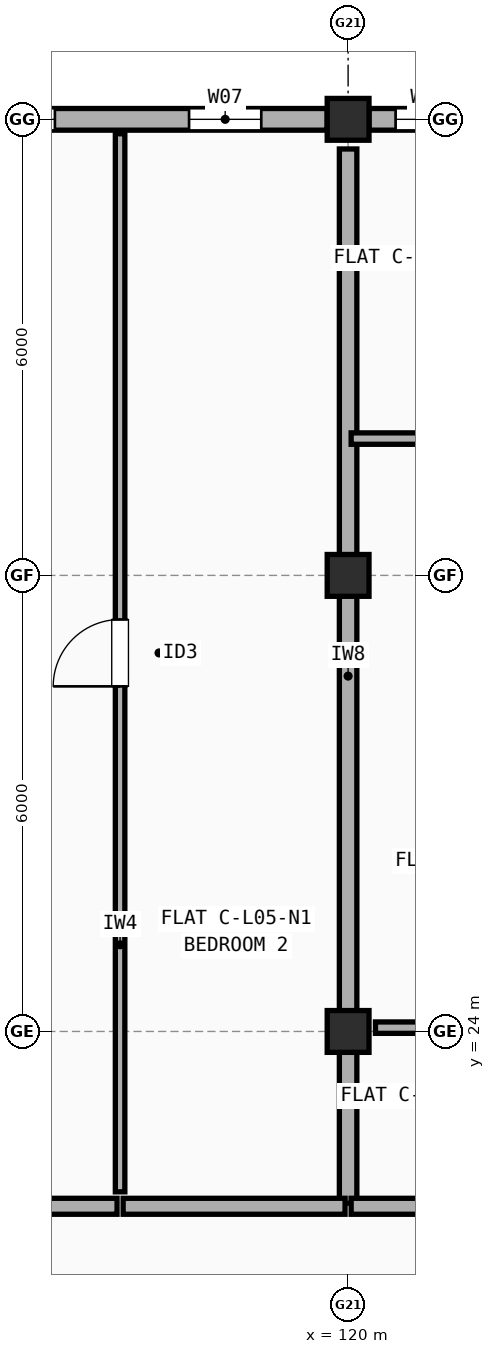
"""IFC4 building model, lengths in metres.
Left out: names, types, materials, properties, quantities, classifications, styles, units other than length and angle.
Written with IfcOpenShell. Run it as: python <this file> out.ifc"""

import sys

from ifc_helpers import new_model, si_unit, direction, frame, frame_2d, origin, origin_2d, place, context, subcontext, project, spatial, rectangle, extrude, element, fill, save


model = new_model("IFC4")
c1 = context("Model", 3, precision=1e-05, world=origin(), true_north=direction((0.0, 1.0)))
c2 = subcontext(c1, "Body", "Model", "MODEL_VIEW")
j1 = project(units=[si_unit("LENGTHUNIT", "METRE"), si_unit("PLANEANGLEUNIT", "RADIAN")], contexts=[c1])
p1 = place(None, origin())
s1 = spatial("IfcSite", under=j1, at=p1, CompositionType="ELEMENT")
p2 = place(p1, origin())
s2 = spatial("IfcBuilding", under=s1, at=p2, CompositionType="ELEMENT")
p3 = place(p2, frame((0.0, 0.0, 17.3)))
s3 = spatial("IfcBuildingStorey", under=s2, at=p3, CompositionType="ELEMENT", Elevation=17.3)
for number, where, z_axis, x_axis in (
    (1, (120.0, 24.0, 0.0), (0.0, 0.0, 1.0), (1.0, 0.0, 0.0)),
    (2, (120.0, 30.0, 0.0), (0.0, 0.0, 1.0), (1.0, 0.0, 0.0)),
    (3, (120.0, 36.0, 0.0), (0.0, 0.0, 1.0), (1.0, 0.0, 0.0)),
):
    element("IfcColumn", number, at=place(p3, frame(where, z_axis=z_axis, x_axis=x_axis)), inside=s3, PredefinedType="COLUMN", context=c2, shape_type="SweptSolid", body=[
        extrude(rectangle(XDim=0.55, YDim=0.55, at=origin_2d()), origin(), (0.0, 0.0, 1.0), 2.965),
    ])
p4 = place(p3, frame((125.725, 36.0, 0.0), z_axis=(0.0, 0.0, 1.0), x_axis=(-1.0, 0.0, 0.0)))
e4 = element("IfcWall", 4, at=p4, inside=s3, PredefinedType="STANDARD", context=c2, shape_type="SweptSolid", body=[
    extrude(rectangle(XDim=5.45, YDim=0.285, at=frame_2d((2.725, 0.0))), origin(), (0.0, 0.0, 1.0), 2.447),
])
p5 = place(p4, frame((1.615, 0.0, 0.9)))
e5 = element("IfcOpeningElement", 5, at=p5, cuts=e4, PredefinedType="OPENING", context=c2, shape_type="SweptSolid", body=[
    extrude(rectangle(XDim=0.85, YDim=1.25, at=frame_2d((0.425, 0.625))), frame((0.0, 0.152, 0.0), z_axis=(0.0, -1.0, 0.0), x_axis=(1.0, 0.0, 0.0)), (0.0, 0.0, 1.0), 0.305),
])
p6 = place(p4, frame((4.25, 0.0, 0.9)))
e6 = element("IfcOpeningElement", 6, at=p6, cuts=e4, PredefinedType="OPENING", context=c2, shape_type="SweptSolid", body=[
    extrude(rectangle(XDim=0.85, YDim=1.25, at=frame_2d((0.425, 0.625))), frame((0.0, 0.152, 0.0), z_axis=(0.0, -1.0, 0.0), x_axis=(1.0, 0.0, 0.0)), (0.0, 0.0, 1.0), 0.305),
])
p7 = place(p3, frame((119.725, 36.0, 0.0), z_axis=(0.0, 0.0, 1.0), x_axis=(-1.0, 0.0, 0.0)))
e7 = element("IfcWall", 7, at=p7, inside=s3, PredefinedType="STANDARD", context=c2, shape_type="SweptSolid", body=[
    extrude(rectangle(XDim=5.45, YDim=0.285, at=frame_2d((2.725, 0.0))), origin(), (0.0, 0.0, 1.0), 2.447),
])
p8 = place(p7, frame((0.867, 0.0, 0.9)))
e8 = element("IfcOpeningElement", 8, at=p8, cuts=e7, PredefinedType="OPENING", context=c2, shape_type="SweptSolid", body=[
    extrude(rectangle(XDim=0.95, YDim=1.35, at=frame_2d((0.475, 0.675))), frame((0.0, 0.152, 0.0), z_axis=(0.0, -1.0, 0.0), x_axis=(1.0, 0.0, 0.0)), (0.0, 0.0, 1.0), 0.305),
])
p9 = place(p7, frame((3.583, 0.0, 0.9)))
e9 = element("IfcOpeningElement", 9, at=p9, cuts=e7, PredefinedType="OPENING", context=c2, shape_type="SweptSolid", body=[
    extrude(rectangle(XDim=1.05, YDim=1.35, at=frame_2d((0.525, 0.675))), frame((0.0, 0.152, 0.0), z_axis=(0.0, -1.0, 0.0), x_axis=(1.0, 0.0, 0.0)), (0.0, 0.0, 1.0), 0.305),
])
p10 = place(p3, frame((120.0, 21.74, 0.0), z_axis=(0.0, 0.0, 1.0), x_axis=(0.0, 1.0, 0.0)))
e10 = element("IfcWall", 10, at=p10, inside=s3, PredefinedType="SOLIDWALL", context=c2, shape_type="SweptSolid", body=[
    extrude(rectangle(XDim=13.87, YDim=0.23, at=frame_2d((6.935, 0.0))), origin(), (0.0, 0.0, 1.0), 2.508),
])
p11 = place(p3, frame((106.54, 21.7, 0.0), z_axis=(0.0, 0.0, 1.0), x_axis=(1.0, 0.0, 0.0)))
e11 = element("IfcWall", 11, at=p11, inside=s3, PredefinedType="SOLIDWALL", context=c2, shape_type="SweptSolid", body=[
    extrude(rectangle(XDim=10.42, YDim=0.21, at=frame_2d((5.21, 0.0))), origin(), (0.0, 0.0, 1.0), 2.508),
])
p12 = place(p11, frame((4.685, 0.0, 0.0)))
e12 = element("IfcOpeningElement", 12, at=p12, cuts=e11, PredefinedType="OPENING", context=c2, shape_type="SweptSolid", body=[
    extrude(rectangle(XDim=1.05, YDim=2.15, at=frame_2d((0.525, 1.075))), frame((0.0, 0.115, 0.0), z_axis=(0.0, -1.0, 0.0), x_axis=(1.0, 0.0, 0.0)), (0.0, 0.0, 1.0), 0.23),
])
p13 = place(p3, frame((117.04, 21.7, 0.0), z_axis=(0.0, 0.0, 1.0), x_axis=(1.0, 0.0, 0.0)))
e13 = element("IfcWall", 13, at=p13, inside=s3, PredefinedType="SOLIDWALL", context=c2, shape_type="SweptSolid", body=[
    extrude(rectangle(XDim=2.92, YDim=0.21, at=frame_2d((1.46, 0.0))), origin(), (0.0, 0.0, 1.0), 2.965),
])
p14 = place(p3, frame((117.0, 21.89, 0.0), z_axis=(0.0, 0.0, 1.0), x_axis=(0.0, 1.0, 0.0)))
e14 = element("IfcWall", 14, at=p14, inside=s3, PredefinedType="PARTITIONING", context=c2, shape_type="SweptSolid", body=[
    extrude(rectangle(XDim=13.92, YDim=0.125, at=frame_2d((6.96, 0.0))), origin(), (0.0, 0.0, 1.0), 2.447),
])
p15 = place(p14, frame((6.65, 0.0, 0.0)))
e15 = element("IfcOpeningElement", 15, at=p15, cuts=e14, PredefinedType="OPENING", context=c2, shape_type="SweptSolid", body=[
    extrude(rectangle(XDim=0.88, YDim=2.1, at=frame_2d((0.44, 1.05))), frame((0.0, 0.073, 0.0), z_axis=(0.0, -1.0, 0.0), x_axis=(1.0, 0.0, 0.0)), (0.0, 0.0, 1.0), 0.145),
])
p16 = place(p3, frame((120.04, 21.7, 0.0), z_axis=(0.0, 0.0, 1.0), x_axis=(1.0, 0.0, 0.0)))
e16 = element("IfcWall", 16, at=p16, inside=s3, PredefinedType="SOLIDWALL", context=c2, shape_type="SweptSolid", body=[
    extrude(rectangle(XDim=4.42, YDim=0.21, at=frame_2d((2.21, 0.0))), origin(), (0.0, 0.0, 1.0), 2.965),
])
p17 = place(p3, frame((120.04, 31.8, 0.0), z_axis=(0.0, 0.0, 1.0), x_axis=(1.0, 0.0, 0.0)))
e17 = element("IfcWall", 17, at=p17, inside=s3, PredefinedType="PARTITIONING", context=c2, shape_type="SweptSolid", body=[
    extrude(rectangle(XDim=4.42, YDim=0.15, at=frame_2d((2.21, 0.0))), origin(), (0.0, 0.0, 1.0), 2.508),
])
p18 = place(p3, frame((120.36, 24.05, 0.0), z_axis=(0.0, 0.0, 1.0), x_axis=(1.0, 0.0, 0.0)))
e18 = element("IfcWall", 18, at=p18, inside=s3, PredefinedType="PARTITIONING", context=c2, shape_type="SweptSolid", body=[
    extrude(rectangle(XDim=4.1, YDim=0.15, at=frame_2d((2.05, 0.0))), origin(), (0.0, 0.0, 1.0), 2.508),
])
p19 = place(p6, origin())
e19 = element("IfcWindow", 19, at=p19, inside=s3, PartitioningType="SINGLE_PANEL", PredefinedType="WINDOW", context=c2, shape_type="SweptSolid", body=[
    extrude(rectangle(XDim=0.85, YDim=1.25, at=frame_2d((0.425, 0.625))), frame((0.0, 0.03, 0.0), z_axis=(0.0, -1.0, 0.0), x_axis=(1.0, 0.0, 0.0)), (0.0, 0.0, 1.0), 0.06),
])
fill(e6, e19)
p20 = place(p8, origin())
e20 = element("IfcWindow", 20, at=p20, inside=s3, PartitioningType="SINGLE_PANEL", PredefinedType="WINDOW", context=c2, shape_type="SweptSolid", body=[
    extrude(rectangle(XDim=0.95, YDim=1.35, at=frame_2d((0.475, 0.675))), frame((0.0, 0.03, 0.0), z_axis=(0.0, -1.0, 0.0), x_axis=(1.0, 0.0, 0.0)), (0.0, 0.0, 1.0), 0.06),
])
fill(e8, e20)
p21 = place(p9, origin())
e21 = element("IfcWindow", 21, at=p21, inside=s3, PartitioningType="SINGLE_PANEL", PredefinedType="WINDOW", context=c2, shape_type="SweptSolid", body=[
    extrude(rectangle(XDim=1.05, YDim=1.35, at=frame_2d((0.525, 0.675))), frame((0.0, 0.03, 0.0), z_axis=(0.0, -1.0, 0.0), x_axis=(1.0, 0.0, 0.0)), (0.0, 0.0, 1.0), 0.06),
])
fill(e9, e21)
p22 = place(p15, origin())
e22 = element("IfcDoor", 22, at=p22, inside=s3, OperationType="SINGLE_SWING_LEFT", PredefinedType="DOOR", context=c2, shape_type="SweptSolid", body=[
    extrude(rectangle(XDim=0.88, YDim=2.1, at=frame_2d((0.44, 1.05))), frame((0.0, 0.025, 0.0), z_axis=(0.0, -1.0, 0.0), x_axis=(1.0, 0.0, 0.0)), (0.0, 0.0, 1.0), 0.05),
])
fill(e15, e22)
save(model, sys.argv[1])
